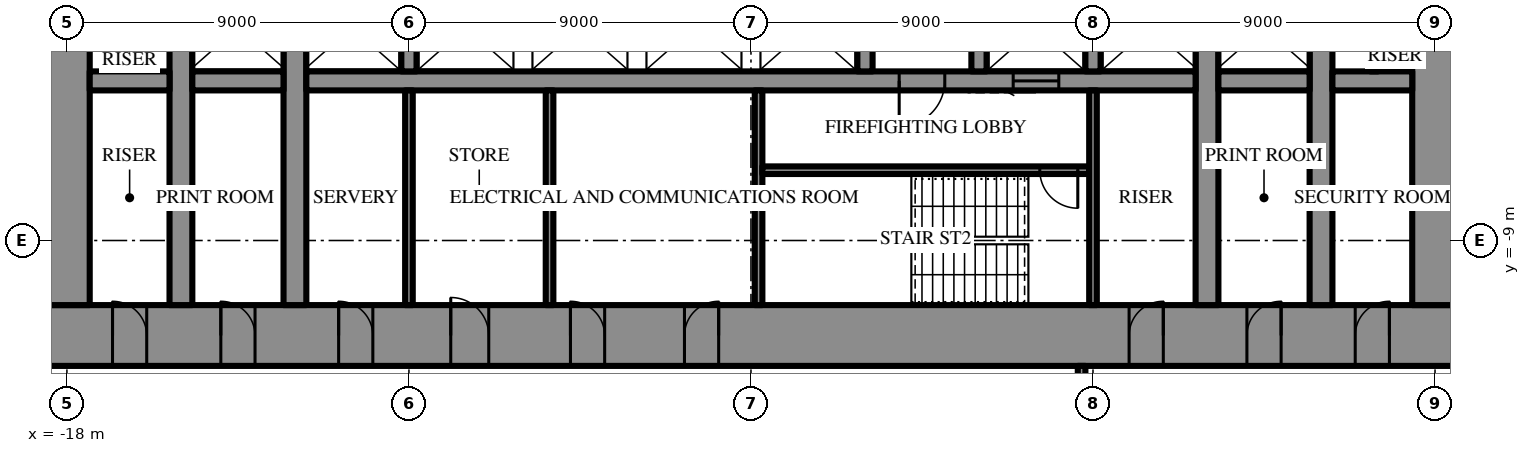
"""IFC4 building model, lengths in metres.
Left out: names, types, materials, properties, quantities, classifications, styles, units other than length and angle.
Written with IfcOpenShell. Run it as: python <this file> out.ifc"""

import sys

from ifc_helpers import new_model, si_unit, direction, frame, frame_2d, origin, place, context, subcontext, project, spatial, rectangle, extrude, element, fill, save


model = new_model("IFC4")
c1 = context("Model", 3, precision=1e-05, world=origin(), true_north=direction((0.0, 1.0)))
c2 = subcontext(c1, "Body", "Model", "MODEL_VIEW")
j1 = project(units=[si_unit("LENGTHUNIT", "METRE"), si_unit("PLANEANGLEUNIT", "RADIAN")], contexts=[c1])
p1 = place(None, origin())
s1 = spatial("IfcSite", under=j1, at=p1, CompositionType="ELEMENT")
p2 = place(p1, origin())
s2 = spatial("IfcBuilding", under=s1, at=p2, CompositionType="ELEMENT")
p3 = place(p2, frame((0.0, 0.0, 140.5)))
s3 = spatial("IfcBuildingStorey", under=s2, at=p3, CompositionType="ELEMENT", Elevation=140.5)
p4 = place(p3, frame((18.6, -11.5, 0.0), z_axis=(0.0, 0.0, 1.0), x_axis=(-1.0, 0.0, 0.0)))
e1 = element("IfcWall", 1, at=p4, inside=s3, PredefinedType="SHEAR", context=c2, shape_type="SweptSolid", body=[
    extrude(rectangle(XDim=37.2, YDim=1.6, at=frame_2d((18.6, 0.0))), origin(), (0.0, 0.0, 1.0), 4.2),
])
p5 = place(p4, frame((19.45, 0.0, 0.0)))
e2 = element("IfcOpeningElement", 2, at=p5, cuts=e1, PredefinedType="OPENING", context=c2, shape_type="SweptSolid", body=[
    extrude(rectangle(XDim=0.9, YDim=2.2, at=frame_2d((0.45, 1.1))), frame((0.0, 0.81, 0.0), z_axis=(0.0, -1.0, 0.0), x_axis=(1.0, 0.0, 0.0)), (0.0, 0.0, 1.0), 1.62),
])
p6 = place(p4, frame((22.45, 0.0, 0.0)))
e3 = element("IfcOpeningElement", 3, at=p6, cuts=e1, PredefinedType="OPENING", context=c2, shape_type="SweptSolid", body=[
    extrude(rectangle(XDim=0.9, YDim=2.2, at=frame_2d((0.45, 1.1))), frame((0.0, 0.81, 0.0), z_axis=(0.0, -1.0, 0.0), x_axis=(1.0, 0.0, 0.0)), (0.0, 0.0, 1.0), 1.62),
])
p7 = place(p4, frame((25.5, 0.0, 0.0)))
e4 = element("IfcOpeningElement", 4, at=p7, cuts=e1, PredefinedType="OPENING", context=c2, shape_type="SweptSolid", body=[
    extrude(rectangle(XDim=1.0, YDim=2.2, at=frame_2d((0.5, 1.1))), frame((0.0, 0.81, 0.0), z_axis=(0.0, -1.0, 0.0), x_axis=(1.0, 0.0, 0.0)), (0.0, 0.0, 1.0), 1.62),
])
p8 = place(p4, frame((1.8, 0.0, 0.0)))
e5 = element("IfcOpeningElement", 5, at=p8, cuts=e1, PredefinedType="OPENING", context=c2, shape_type="SweptSolid", body=[
    extrude(rectangle(XDim=0.9, YDim=2.2, at=frame_2d((0.45, 1.1))), frame((0.0, 0.81, 0.0), z_axis=(0.0, -1.0, 0.0), x_axis=(1.0, 0.0, 0.0)), (0.0, 0.0, 1.0), 1.62),
])
p9 = place(p4, frame((4.65, 0.0, 0.0)))
e6 = element("IfcOpeningElement", 6, at=p9, cuts=e1, PredefinedType="OPENING", context=c2, shape_type="SweptSolid", body=[
    extrude(rectangle(XDim=0.9, YDim=2.2, at=frame_2d((0.45, 1.1))), frame((0.0, 0.81, 0.0), z_axis=(0.0, -1.0, 0.0), x_axis=(1.0, 0.0, 0.0)), (0.0, 0.0, 1.0), 1.62),
])
p10 = place(p4, frame((7.75, 0.0, 0.0)))
e7 = element("IfcOpeningElement", 7, at=p10, cuts=e1, PredefinedType="OPENING", context=c2, shape_type="SweptSolid", body=[
    extrude(rectangle(XDim=0.9, YDim=2.2, at=frame_2d((0.45, 1.1))), frame((0.0, 0.81, 0.0), z_axis=(0.0, -1.0, 0.0), x_axis=(1.0, 0.0, 0.0)), (0.0, 0.0, 1.0), 1.62),
])
p11 = place(p4, frame((28.55, 0.0, 0.0)))
e8 = element("IfcOpeningElement", 8, at=p11, cuts=e1, PredefinedType="OPENING", context=c2, shape_type="SweptSolid", body=[
    extrude(rectangle(XDim=0.9, YDim=2.2, at=frame_2d((0.45, 1.1))), frame((0.0, 0.81, 0.0), z_axis=(0.0, -1.0, 0.0), x_axis=(1.0, 0.0, 0.0)), (0.0, 0.0, 1.0), 1.62),
])
p12 = place(p4, frame((31.65, 0.0, 0.0)))
e9 = element("IfcOpeningElement", 9, at=p12, cuts=e1, PredefinedType="OPENING", context=c2, shape_type="SweptSolid", body=[
    extrude(rectangle(XDim=0.9, YDim=2.2, at=frame_2d((0.45, 1.1))), frame((0.0, 0.81, 0.0), z_axis=(0.0, -1.0, 0.0), x_axis=(1.0, 0.0, 0.0)), (0.0, 0.0, 1.0), 1.62),
])
p13 = place(p4, frame((34.5, 0.0, 0.0)))
e10 = element("IfcOpeningElement", 10, at=p13, cuts=e1, PredefinedType="OPENING", context=c2, shape_type="SweptSolid", body=[
    extrude(rectangle(XDim=0.9, YDim=2.2, at=frame_2d((0.45, 1.1))), frame((0.0, 0.81, 0.0), z_axis=(0.0, -1.0, 0.0), x_axis=(1.0, 0.0, 0.0)), (0.0, 0.0, 1.0), 1.62),
])
p14 = place(p3, frame((18.0, -10.7, 0.0), z_axis=(0.0, 0.0, 1.0), x_axis=(0.0, 1.0, 0.0)))
e11 = element("IfcWall", 11, at=p14, inside=s3, PredefinedType="SHEAR", context=c2, shape_type="SweptSolid", body=[
    extrude(rectangle(XDim=21.4, YDim=1.2, at=frame_2d((10.7, 0.0))), origin(), (0.0, 0.0, 1.0), 4.2),
])
p15 = place(p14, frame((9.8, 0.0, 0.0)))
e12 = element("IfcOpeningElement", 12, at=p15, cuts=e11, PredefinedType="OPENING", context=c2, shape_type="SweptSolid", body=[
    extrude(rectangle(XDim=1.8, YDim=2.4, at=frame_2d((0.9, 1.2))), frame((0.0, 0.61, 0.0), z_axis=(0.0, -1.0, 0.0), x_axis=(1.0, 0.0, 0.0)), (0.0, 0.0, 1.0), 1.22),
])
p16 = place(p3, frame((-18.0, 10.7, 0.0), z_axis=(0.0, 0.0, 1.0), x_axis=(0.0, -1.0, 0.0)))
e13 = element("IfcWall", 13, at=p16, inside=s3, PredefinedType="SHEAR", context=c2, shape_type="SweptSolid", body=[
    extrude(rectangle(XDim=21.4, YDim=1.2, at=frame_2d((10.7, 0.0))), origin(), (0.0, 0.0, 1.0), 4.2),
])
p17 = place(p16, frame((9.8, 0.0, 0.0)))
e14 = element("IfcOpeningElement", 14, at=p17, cuts=e13, PredefinedType="OPENING", context=c2, shape_type="SweptSolid", body=[
    extrude(rectangle(XDim=1.8, YDim=2.4, at=frame_2d((0.9, 1.2))), frame((0.0, 0.61, 0.0), z_axis=(0.0, -1.0, 0.0), x_axis=(1.0, 0.0, 0.0)), (0.0, 0.0, 1.0), 1.22),
])
p18 = place(p3, frame((12.0, -10.7, 0.0), z_axis=(0.0, 0.0, 1.0), x_axis=(0.0, 1.0, 0.0)))
e15 = element("IfcWall", 15, at=p18, inside=s3, PredefinedType="SHEAR", context=c2, shape_type="SweptSolid", body=[
    extrude(rectangle(XDim=21.4, YDim=0.6, at=frame_2d((10.7, 0.0))), origin(), (0.0, 0.0, 1.0), 4.2),
])
p19 = place(p18, frame((9.8, 0.0, 0.0)))
e16 = element("IfcOpeningElement", 16, at=p19, cuts=e15, PredefinedType="OPENING", context=c2, shape_type="SweptSolid", body=[
    extrude(rectangle(XDim=1.8, YDim=2.4, at=frame_2d((0.9, 1.2))), frame((0.0, 0.31, 0.0), z_axis=(0.0, -1.0, 0.0), x_axis=(1.0, 0.0, 0.0)), (0.0, 0.0, 1.0), 0.62),
])
p20 = place(p3, frame((-12.0, -10.7, 0.0), z_axis=(0.0, 0.0, 1.0), x_axis=(0.0, 1.0, 0.0)))
e17 = element("IfcWall", 17, at=p20, inside=s3, PredefinedType="SHEAR", context=c2, shape_type="SweptSolid", body=[
    extrude(rectangle(XDim=21.4, YDim=0.6, at=frame_2d((10.7, 0.0))), origin(), (0.0, 0.0, 1.0), 4.2),
])
p21 = place(p20, frame((9.8, 0.0, 0.0)))
e18 = element("IfcOpeningElement", 18, at=p21, cuts=e17, PredefinedType="OPENING", context=c2, shape_type="SweptSolid", body=[
    extrude(rectangle(XDim=1.8, YDim=2.4, at=frame_2d((0.9, 1.2))), frame((0.0, 0.31, 0.0), z_axis=(0.0, -1.0, 0.0), x_axis=(1.0, 0.0, 0.0)), (0.0, 0.0, 1.0), 0.62),
])
p22 = place(p3, frame((15.0, -10.7, 0.0), z_axis=(0.0, 0.0, 1.0), x_axis=(0.0, 1.0, 0.0)))
e19 = element("IfcWall", 19, at=p22, inside=s3, PredefinedType="SHEAR", context=c2, shape_type="SweptSolid", body=[
    extrude(rectangle(XDim=21.4, YDim=0.6, at=frame_2d((10.7, 0.0))), origin(), (0.0, 0.0, 1.0), 4.2),
])
p23 = place(p22, frame((9.8, 0.0, 0.0)))
e20 = element("IfcOpeningElement", 20, at=p23, cuts=e19, PredefinedType="OPENING", context=c2, shape_type="SweptSolid", body=[
    extrude(rectangle(XDim=1.8, YDim=2.4, at=frame_2d((0.9, 1.2))), frame((0.0, 0.31, 0.0), z_axis=(0.0, -1.0, 0.0), x_axis=(1.0, 0.0, 0.0)), (0.0, 0.0, 1.0), 0.62),
])
p24 = place(p3, frame((-15.0, -10.7, 0.0), z_axis=(0.0, 0.0, 1.0), x_axis=(0.0, 1.0, 0.0)))
e21 = element("IfcWall", 21, at=p24, inside=s3, PredefinedType="SHEAR", context=c2, shape_type="SweptSolid", body=[
    extrude(rectangle(XDim=21.4, YDim=0.6, at=frame_2d((10.7, 0.0))), origin(), (0.0, 0.0, 1.0), 4.2),
])
p25 = place(p24, frame((9.8, 0.0, 0.0)))
e22 = element("IfcOpeningElement", 22, at=p25, cuts=e21, PredefinedType="OPENING", context=c2, shape_type="SweptSolid", body=[
    extrude(rectangle(XDim=1.8, YDim=2.4, at=frame_2d((0.9, 1.2))), frame((0.0, 0.31, 0.0), z_axis=(0.0, -1.0, 0.0), x_axis=(1.0, 0.0, 0.0)), (0.0, 0.0, 1.0), 0.62),
])
p26 = place(p3, frame((17.4, -4.8, 0.0), z_axis=(0.0, 0.0, 1.0), x_axis=(-1.0, 0.0, 0.0)))
e23 = element("IfcWall", 23, at=p26, inside=s3, PredefinedType="SHEAR", context=c2, shape_type="SweptSolid", body=[
    extrude(rectangle(XDim=2.1, YDim=0.5, at=frame_2d((1.05, 0.0))), origin(), (0.0, 0.0, 1.0), 4.2),
])
p27 = place(p3, frame((14.7, -4.8, 0.0), z_axis=(0.0, 0.0, 1.0), x_axis=(-1.0, 0.0, 0.0)))
e24 = element("IfcWall", 24, at=p27, inside=s3, PredefinedType="SHEAR", context=c2, shape_type="SweptSolid", body=[
    extrude(rectangle(XDim=2.4, YDim=0.5, at=frame_2d((1.2, 0.0))), origin(), (0.0, 0.0, 1.0), 4.2),
])
p28 = place(p3, frame((11.7, -4.8, 0.0), z_axis=(0.0, 0.0, 1.0), x_axis=(-1.0, 0.0, 0.0)))
e25 = element("IfcWall", 25, at=p28, inside=s3, PredefinedType="SHEAR", context=c2, shape_type="SweptSolid", body=[
    extrude(rectangle(XDim=23.4, YDim=0.5, at=frame_2d((11.7, 0.0))), origin(), (0.0, 0.0, 1.0), 4.2),
])
p29 = place(p28, frame((6.6, 0.0, 0.0)))
e26 = element("IfcOpeningElement", 26, at=p29, cuts=e25, PredefinedType="OPENING", context=c2, shape_type="SweptSolid", body=[
    extrude(rectangle(XDim=1.2, YDim=2.2, at=frame_2d((0.6, 1.1))), frame((0.0, 0.26, 0.0), z_axis=(0.0, -1.0, 0.0), x_axis=(1.0, 0.0, 0.0)), (0.0, 0.0, 1.0), 0.52),
])
p30 = place(p28, frame((3.6, 0.0, 0.0)))
e27 = element("IfcOpeningElement", 27, at=p30, cuts=e25, PredefinedType="OPENING", context=c2, shape_type="SweptSolid", body=[
    extrude(rectangle(XDim=1.2, YDim=2.2, at=frame_2d((0.6, 1.1))), frame((0.0, 0.26, 0.0), z_axis=(0.0, -1.0, 0.0), x_axis=(1.0, 0.0, 0.0)), (0.0, 0.0, 1.0), 0.52),
])
p31 = place(p3, frame((-12.3, -4.8, 0.0), z_axis=(0.0, 0.0, 1.0), x_axis=(-1.0, 0.0, 0.0)))
e28 = element("IfcWall", 28, at=p31, inside=s3, PredefinedType="SHEAR", context=c2, shape_type="SweptSolid", body=[
    extrude(rectangle(XDim=2.4, YDim=0.5, at=frame_2d((1.2, 0.0))), origin(), (0.0, 0.0, 1.0), 4.2),
])
p32 = place(p3, frame((-15.3, -4.8, 0.0), z_axis=(0.0, 0.0, 1.0), x_axis=(-1.0, 0.0, 0.0)))
e29 = element("IfcWall", 29, at=p32, inside=s3, PredefinedType="SHEAR", context=c2, shape_type="SweptSolid", body=[
    extrude(rectangle(XDim=2.1, YDim=0.5, at=frame_2d((1.05, 0.0))), origin(), (0.0, 0.0, 1.0), 4.2),
])
for number, where, z_axis, x_axis in (
    (30, (9.0, -2.25, 0.0), (0.0, 0.0, 1.0), (0.0, -1.0, 0.0)),
    (31, (6.0, -2.25, 0.0), (0.0, 0.0, 1.0), (0.0, -1.0, 0.0)),
    (32, (3.0, -2.25, 0.0), (0.0, 0.0, 1.0), (0.0, -1.0, 0.0)),
    (33, (-9.0, -2.25, 0.0), (0.0, 0.0, 1.0), (0.0, -1.0, 0.0)),
):
    element("IfcWall", number, at=place(p3, frame(where, z_axis=z_axis, x_axis=x_axis)), inside=s3, PredefinedType="SHEAR", context=c2, shape_type="SweptSolid", body=[
        extrude(rectangle(XDim=2.3, YDim=0.4, at=frame_2d((1.15, 0.0))), origin(), (0.0, 0.0, 1.0), 4.2),
    ])
p33 = place(p3, frame((0.2, -5.05, 0.0), z_axis=(0.0, 0.0, 1.0), x_axis=(0.0, -1.0, 0.0)))
e34 = element("IfcWall", 34, at=p33, inside=s3, PredefinedType="SHEAR", context=c2, shape_type="SweptSolid", body=[
    extrude(rectangle(XDim=5.65, YDim=0.2, at=frame_2d((2.825, 0.0))), origin(), (0.0, 0.0, 1.0), 4.2),
])
p34 = place(p3, frame((8.9, -7.15, 0.0), z_axis=(0.0, 0.0, 1.0), x_axis=(-1.0, 0.0, 0.0)))
e35 = element("IfcWall", 35, at=p34, inside=s3, PredefinedType="SHEAR", context=c2, shape_type="SweptSolid", body=[
    extrude(rectangle(XDim=8.6, YDim=0.2, at=frame_2d((4.3, 0.0))), origin(), (0.0, 0.0, 1.0), 4.2),
])
p35 = place(p34, frame((0.3, 0.0, 0.0)))
e36 = element("IfcOpeningElement", 36, at=p35, cuts=e35, PredefinedType="OPENING", context=c2, shape_type="SweptSolid", body=[
    extrude(rectangle(XDim=1.0, YDim=2.2, at=frame_2d((0.5, 1.1))), frame((0.0, 0.11, 0.0), z_axis=(0.0, -1.0, 0.0), x_axis=(1.0, 0.0, 0.0)), (0.0, 0.0, 1.0), 0.22),
])
for number, where, z_axis, x_axis in (
    (37, (9.0, -5.05, 0.0), (0.0, 0.0, 1.0), (0.0, -1.0, 0.0)),
    (38, (-9.0, -5.05, 0.0), (0.0, 0.0, 1.0), (0.0, -1.0, 0.0)),
    (39, (-5.3, -5.05, 0.0), (0.0, 0.0, 1.0), (0.0, -1.0, 0.0)),
):
    element("IfcWall", number, at=place(p3, frame(where, z_axis=z_axis, x_axis=x_axis)), inside=s3, PredefinedType="PARTITIONING", context=c2, shape_type="SweptSolid", body=[
        extrude(rectangle(XDim=5.65, YDim=0.2, at=frame_2d((2.825, 0.0))), origin(), (0.0, 0.0, 1.0), 4.0),
    ])
p36 = place(p3, frame((16.4, -3.55, 0.0), z_axis=(0.0, 0.0, 1.0), x_axis=(0.0, -1.0, 0.0)))
e40 = element("IfcWall", 40, at=p36, inside=s3, PredefinedType="PARTITIONING", context=c2, shape_type="SweptSolid", body=[
    extrude(rectangle(XDim=1.0, YDim=0.2, at=frame_2d((0.5, 0.0))), origin(), (0.0, 0.0, 1.0), 4.0),
])
p37 = place(p3, frame((8.7, -12.3, 0.0), z_axis=(0.0, 0.0, 1.0), x_axis=(0.0, -1.0, 0.0)))
e41 = element("IfcWall", 41, at=p37, inside=s3, PredefinedType="PARTITIONING", context=c2, shape_type="SweptSolid", body=[
    extrude(rectangle(XDim=19.0, YDim=0.2, at=frame_2d((9.5, 0.0))), origin(), (0.0, 0.0, 1.0), 4.0),
])
p38 = place(p37, frame((1.4, 0.0, 0.0)))
e42 = element("IfcOpeningElement", 42, at=p38, cuts=e41, PredefinedType="OPENING", context=c2, shape_type="SweptSolid", body=[
    extrude(rectangle(XDim=1.0, YDim=2.2, at=frame_2d((0.5, 1.1))), frame((0.0, 0.11, 0.0), z_axis=(0.0, -1.0, 0.0), x_axis=(1.0, 0.0, 0.0)), (0.0, 0.0, 1.0), 0.22),
])
p39 = place(p29, origin())
e43 = element("IfcDoor", 43, at=p39, inside=s3, OperationType="SINGLE_SWING_LEFT", PredefinedType="DOOR", context=c2, shape_type="SweptSolid", body=[
    extrude(rectangle(XDim=1.2, YDim=2.2, at=frame_2d((0.6, 1.1))), frame((0.0, 0.025, 0.0), z_axis=(0.0, -1.0, 0.0), x_axis=(1.0, 0.0, 0.0)), (0.0, 0.0, 1.0), 0.05),
])
fill(e26, e43)
p40 = place(p35, origin())
e44 = element("IfcDoor", 44, at=p40, inside=s3, OperationType="SINGLE_SWING_RIGHT", PredefinedType="DOOR", context=c2, shape_type="SweptSolid", body=[
    extrude(rectangle(XDim=1.0, YDim=2.2, at=frame_2d((0.5, 1.1))), frame((0.0, 0.025, 0.0), z_axis=(0.0, -1.0, 0.0), x_axis=(1.0, 0.0, 0.0)), (0.0, 0.0, 1.0), 0.05),
])
fill(e36, e44)
p41 = place(p5, frame((0.9, 0.0, 0.0), z_axis=(0.0, 0.0, 1.0), x_axis=(-1.0, 0.0, 0.0)))
e45 = element("IfcDoor", 45, at=p41, inside=s3, OperationType="SINGLE_SWING_LEFT", PredefinedType="DOOR", context=c2, shape_type="SweptSolid", body=[
    extrude(rectangle(XDim=0.9, YDim=2.2, at=frame_2d((0.45, 1.1))), frame((0.0, 0.025, 0.0), z_axis=(0.0, -1.0, 0.0), x_axis=(1.0, 0.0, 0.0)), (0.0, 0.0, 1.0), 0.05),
])
fill(e2, e45)
p42 = place(p6, frame((0.9, 0.0, 0.0), z_axis=(0.0, 0.0, 1.0), x_axis=(-1.0, 0.0, 0.0)))
e46 = element("IfcDoor", 46, at=p42, inside=s3, OperationType="SINGLE_SWING_RIGHT", PredefinedType="DOOR", context=c2, shape_type="SweptSolid", body=[
    extrude(rectangle(XDim=0.9, YDim=2.2, at=frame_2d((0.45, 1.1))), frame((0.0, 0.025, 0.0), z_axis=(0.0, -1.0, 0.0), x_axis=(1.0, 0.0, 0.0)), (0.0, 0.0, 1.0), 0.05),
])
fill(e3, e46)
p43 = place(p7, frame((1.0, 0.0, 0.0), z_axis=(0.0, 0.0, 1.0), x_axis=(-1.0, 0.0, 0.0)))
e47 = element("IfcDoor", 47, at=p43, inside=s3, OperationType="SINGLE_SWING_RIGHT", PredefinedType="DOOR", context=c2, shape_type="SweptSolid", body=[
    extrude(rectangle(XDim=1.0, YDim=2.2, at=frame_2d((0.5, 1.1))), frame((0.0, 0.025, 0.0), z_axis=(0.0, -1.0, 0.0), x_axis=(1.0, 0.0, 0.0)), (0.0, 0.0, 1.0), 0.05),
])
fill(e4, e47)
p44 = place(p8, frame((0.9, 0.0, 0.0), z_axis=(0.0, 0.0, 1.0), x_axis=(-1.0, 0.0, 0.0)))
e48 = element("IfcDoor", 48, at=p44, inside=s3, OperationType="SINGLE_SWING_LEFT", PredefinedType="DOOR", context=c2, shape_type="SweptSolid", body=[
    extrude(rectangle(XDim=0.9, YDim=2.2, at=frame_2d((0.45, 1.1))), frame((0.0, 0.025, 0.0), z_axis=(0.0, -1.0, 0.0), x_axis=(1.0, 0.0, 0.0)), (0.0, 0.0, 1.0), 0.05),
])
fill(e5, e48)
p45 = place(p9, frame((0.9, 0.0, 0.0), z_axis=(0.0, 0.0, 1.0), x_axis=(-1.0, 0.0, 0.0)))
e49 = element("IfcDoor", 49, at=p45, inside=s3, OperationType="SINGLE_SWING_LEFT", PredefinedType="DOOR", context=c2, shape_type="SweptSolid", body=[
    extrude(rectangle(XDim=0.9, YDim=2.2, at=frame_2d((0.45, 1.1))), frame((0.0, 0.025, 0.0), z_axis=(0.0, -1.0, 0.0), x_axis=(1.0, 0.0, 0.0)), (0.0, 0.0, 1.0), 0.05),
])
fill(e6, e49)
p46 = place(p10, frame((0.9, 0.0, 0.0), z_axis=(0.0, 0.0, 1.0), x_axis=(-1.0, 0.0, 0.0)))
e50 = element("IfcDoor", 50, at=p46, inside=s3, OperationType="SINGLE_SWING_LEFT", PredefinedType="DOOR", context=c2, shape_type="SweptSolid", body=[
    extrude(rectangle(XDim=0.9, YDim=2.2, at=frame_2d((0.45, 1.1))), frame((0.0, 0.025, 0.0), z_axis=(0.0, -1.0, 0.0), x_axis=(1.0, 0.0, 0.0)), (0.0, 0.0, 1.0), 0.05),
])
fill(e7, e50)
p47 = place(p11, frame((0.9, 0.0, 0.0), z_axis=(0.0, 0.0, 1.0), x_axis=(-1.0, 0.0, 0.0)))
e51 = element("IfcDoor", 51, at=p47, inside=s3, OperationType="SINGLE_SWING_RIGHT", PredefinedType="DOOR", context=c2, shape_type="SweptSolid", body=[
    extrude(rectangle(XDim=0.9, YDim=2.2, at=frame_2d((0.45, 1.1))), frame((0.0, 0.025, 0.0), z_axis=(0.0, -1.0, 0.0), x_axis=(1.0, 0.0, 0.0)), (0.0, 0.0, 1.0), 0.05),
])
fill(e8, e51)
p48 = place(p12, frame((0.9, 0.0, 0.0), z_axis=(0.0, 0.0, 1.0), x_axis=(-1.0, 0.0, 0.0)))
e52 = element("IfcDoor", 52, at=p48, inside=s3, OperationType="SINGLE_SWING_RIGHT", PredefinedType="DOOR", context=c2, shape_type="SweptSolid", body=[
    extrude(rectangle(XDim=0.9, YDim=2.2, at=frame_2d((0.45, 1.1))), frame((0.0, 0.025, 0.0), z_axis=(0.0, -1.0, 0.0), x_axis=(1.0, 0.0, 0.0)), (0.0, 0.0, 1.0), 0.05),
])
fill(e9, e52)
p49 = place(p13, frame((0.9, 0.0, 0.0), z_axis=(0.0, 0.0, 1.0), x_axis=(-1.0, 0.0, 0.0)))
e53 = element("IfcDoor", 53, at=p49, inside=s3, OperationType="SINGLE_SWING_RIGHT", PredefinedType="DOOR", context=c2, shape_type="SweptSolid", body=[
    extrude(rectangle(XDim=0.9, YDim=2.2, at=frame_2d((0.45, 1.1))), frame((0.0, 0.025, 0.0), z_axis=(0.0, -1.0, 0.0), x_axis=(1.0, 0.0, 0.0)), (0.0, 0.0, 1.0), 0.05),
])
fill(e10, e53)
p50 = place(p30, origin())
e54 = element("IfcDoor", 54, at=p50, inside=s3, OperationType="SLIDING_TO_LEFT", PredefinedType="DOOR", context=c2, shape_type="SweptSolid", body=[
    extrude(rectangle(XDim=1.2, YDim=2.2, at=frame_2d((0.6, 1.1))), frame((0.0, 0.025, 0.0), z_axis=(0.0, -1.0, 0.0), x_axis=(1.0, 0.0, 0.0)), (0.0, 0.0, 1.0), 0.05),
])
fill(e27, e54)
save(model, sys.argv[1])
